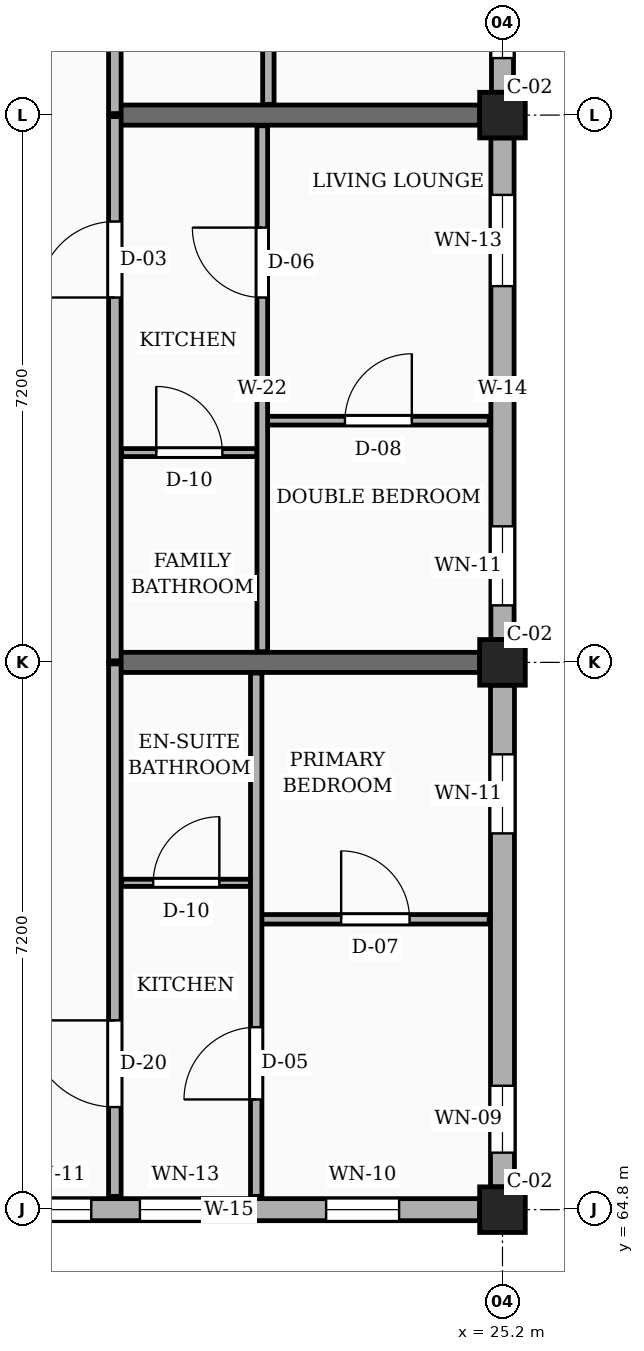
"""IFC4 building model, lengths in metres.
Left out: names, types, materials, properties, quantities, classifications, styles, units other than length and angle.
Written with IfcOpenShell. Run it as: python <this file> out.ifc"""

import sys

from ifc_helpers import new_model, si_unit, direction, frame, frame_2d, origin, origin_2d, place, context, subcontext, project, spatial, rectangle, extrude, element, fill, save


model = new_model("IFC4")
c1 = context("Model", 3, precision=1e-05, world=origin(), true_north=direction((0.0, 1.0)))
c2 = subcontext(c1, "Body", "Model", "MODEL_VIEW")
j1 = project(units=[si_unit("LENGTHUNIT", "METRE"), si_unit("PLANEANGLEUNIT", "RADIAN")], contexts=[c1])
p1 = place(None, origin())
s1 = spatial("IfcSite", under=j1, at=p1, CompositionType="ELEMENT")
p2 = place(p1, origin())
s2 = spatial("IfcBuilding", under=s1, at=p2, CompositionType="ELEMENT")
p3 = place(p2, frame((0.0, 0.0, 4.5)))
s3 = spatial("IfcBuildingStorey", under=s2, at=p3, CompositionType="ELEMENT", Elevation=4.5)
for number, where, z_axis, x_axis in (
    (1, (25.2, 64.8, 0.0), (0.0, 0.0, 1.0), (1.0, 0.0, 0.0)),
    (2, (25.2, 72.0, 0.0), (0.0, 0.0, 1.0), (1.0, 0.0, 0.0)),
    (3, (25.2, 79.2, 0.0), (0.0, 0.0, 1.0), (1.0, 0.0, 0.0)),
):
    element("IfcColumn", number, at=place(p3, frame(where, z_axis=z_axis, x_axis=x_axis)), inside=s3, PredefinedType="COLUMN", context=c2, shape_type="SweptSolid", body=[
        extrude(rectangle(XDim=0.6, YDim=0.6, at=origin_2d()), origin(), (0.0, 0.0, 1.0), 3.15),
    ])
for number, where, z_axis, x_axis in (
    (4, (20.1, 72.0, 0.0), (0.0, 0.0, 1.0), (1.0, 0.0, 0.0)),
    (5, (20.1, 79.2, 0.0), (0.0, 0.0, 1.0), (1.0, 0.0, 0.0)),
):
    element("IfcWall", number, at=place(p3, frame(where, z_axis=z_axis, x_axis=x_axis)), inside=s3, PredefinedType="SOLIDWALL", context=c2, shape_type="SweptSolid", body=[
        extrude(rectangle(XDim=4.8, YDim=0.265, at=frame_2d((2.4, 0.0))), origin(), (0.0, 0.0, 1.0), 2.21),
    ])
p4 = place(p3, frame((18.3, 64.8, 0.0), z_axis=(0.0, 0.0, 1.0), x_axis=(1.0, 0.0, 0.0)))
e6 = element("IfcWall", 6, at=p4, inside=s3, PredefinedType="SOLIDWALL", context=c2, shape_type="SweptSolid", body=[
    extrude(rectangle(XDim=6.6, YDim=0.29, at=frame_2d((3.3, 0.0))), origin(), (0.0, 0.0, 1.0), 2.48),
])
p5 = place(p4, frame((0.45, 0.0, 0.78)))
e7 = element("IfcOpeningElement", 7, at=p5, cuts=e6, PredefinedType="OPENING", context=c2, shape_type="SweptSolid", body=[
    extrude(rectangle(XDim=1.04, YDim=1.26, at=frame_2d((0.52, 0.63))), frame((0.0, 0.155, 0.0), z_axis=(0.0, -1.0, 0.0), x_axis=(1.0, 0.0, 0.0)), (0.0, 0.0, 1.0), 0.31),
])
p6 = place(p4, frame((2.13, 0.0, 0.78)))
e8 = element("IfcOpeningElement", 8, at=p6, cuts=e6, PredefinedType="OPENING", context=c2, shape_type="SweptSolid", body=[
    extrude(rectangle(XDim=1.2, YDim=1.26, at=frame_2d((0.6, 0.63))), frame((0.0, 0.155, 0.0), z_axis=(0.0, -1.0, 0.0), x_axis=(1.0, 0.0, 0.0)), (0.0, 0.0, 1.0), 0.31),
])
p7 = place(p4, frame((4.58, 0.0, 0.78)))
e9 = element("IfcOpeningElement", 9, at=p7, cuts=e6, PredefinedType="OPENING", context=c2, shape_type="SweptSolid", body=[
    extrude(rectangle(XDim=0.96, YDim=1.26, at=frame_2d((0.48, 0.63))), frame((0.0, 0.155, 0.0), z_axis=(0.0, -1.0, 0.0), x_axis=(1.0, 0.0, 0.0)), (0.0, 0.0, 1.0), 0.31),
])
p8 = place(p3, frame((25.2, 65.1, 0.0), z_axis=(0.0, 0.0, 1.0), x_axis=(0.0, 1.0, 0.0)))
e10 = element("IfcWall", 10, at=p8, inside=s3, PredefinedType="SOLIDWALL", context=c2, shape_type="SweptSolid", body=[
    extrude(rectangle(XDim=6.6, YDim=0.315, at=frame_2d((3.3, 0.0))), origin(), (0.0, 0.0, 1.0), 2.48),
])
p9 = place(p8, frame((0.45, 0.0, 0.78)))
e11 = element("IfcOpeningElement", 11, at=p9, cuts=e10, PredefinedType="OPENING", context=c2, shape_type="SweptSolid", body=[
    extrude(rectangle(XDim=0.88, YDim=1.26, at=frame_2d((0.44, 0.63))), frame((0.0, 0.167, 0.0), z_axis=(0.0, -1.0, 0.0), x_axis=(1.0, 0.0, 0.0)), (0.0, 0.0, 1.0), 0.335),
])
p10 = place(p8, frame((4.65, 0.0, 0.78)))
e12 = element("IfcOpeningElement", 12, at=p10, cuts=e10, PredefinedType="OPENING", context=c2, shape_type="SweptSolid", body=[
    extrude(rectangle(XDim=1.04, YDim=1.26, at=frame_2d((0.52, 0.63))), frame((0.0, 0.167, 0.0), z_axis=(0.0, -1.0, 0.0), x_axis=(1.0, 0.0, 0.0)), (0.0, 0.0, 1.0), 0.335),
])
p11 = place(p3, frame((25.2, 72.3, 0.0), z_axis=(0.0, 0.0, 1.0), x_axis=(0.0, 1.0, 0.0)))
e13 = element("IfcWall", 13, at=p11, inside=s3, PredefinedType="SOLIDWALL", context=c2, shape_type="SweptSolid", body=[
    extrude(rectangle(XDim=6.6, YDim=0.305, at=frame_2d((3.3, 0.0))), origin(), (0.0, 0.0, 1.0), 2.48),
])
p12 = place(p11, frame((0.45, 0.0, 0.78)))
e14 = element("IfcOpeningElement", 14, at=p12, cuts=e13, PredefinedType="OPENING", context=c2, shape_type="SweptSolid", body=[
    extrude(rectangle(XDim=1.04, YDim=1.26, at=frame_2d((0.52, 0.63))), frame((0.0, 0.163, 0.0), z_axis=(0.0, -1.0, 0.0), x_axis=(1.0, 0.0, 0.0)), (0.0, 0.0, 1.0), 0.325),
])
p13 = place(p11, frame((4.65, 0.0, 0.78)))
e15 = element("IfcOpeningElement", 15, at=p13, cuts=e13, PredefinedType="OPENING", context=c2, shape_type="SweptSolid", body=[
    extrude(rectangle(XDim=1.2, YDim=1.26, at=frame_2d((0.6, 0.63))), frame((0.0, 0.163, 0.0), z_axis=(0.0, -1.0, 0.0), x_axis=(1.0, 0.0, 0.0)), (0.0, 0.0, 1.0), 0.325),
])
p14 = place(p3, frame((25.2, 79.5, 0.0), z_axis=(0.0, 0.0, 1.0), x_axis=(0.0, 1.0, 0.0)))
e16 = element("IfcWall", 16, at=p14, inside=s3, PredefinedType="SOLIDWALL", context=c2, shape_type="SweptSolid", body=[
    extrude(rectangle(XDim=6.6, YDim=0.29, at=frame_2d((3.3, 0.0))), origin(), (0.0, 0.0, 1.0), 2.48),
])
p15 = place(p14, frame((0.45, 0.0, 0.78)))
e17 = element("IfcOpeningElement", 17, at=p15, cuts=e16, PredefinedType="OPENING", context=c2, shape_type="SweptSolid", body=[
    extrude(rectangle(XDim=1.2, YDim=1.26, at=frame_2d((0.6, 0.63))), frame((0.0, 0.155, 0.0), z_axis=(0.0, -1.0, 0.0), x_axis=(1.0, 0.0, 0.0)), (0.0, 0.0, 1.0), 0.31),
])
p16 = place(p14, frame((4.65, 0.0, 0.78)))
e18 = element("IfcOpeningElement", 18, at=p16, cuts=e16, PredefinedType="OPENING", context=c2, shape_type="SweptSolid", body=[
    extrude(rectangle(XDim=1.36, YDim=1.26, at=frame_2d((0.68, 0.63))), frame((0.0, 0.155, 0.0), z_axis=(0.0, -1.0, 0.0), x_axis=(1.0, 0.0, 0.0)), (0.0, 0.0, 1.0), 0.31),
])
p17 = place(p3, frame((20.1, 64.975, 0.0), z_axis=(0.0, 0.0, 1.0), x_axis=(0.0, 1.0, 0.0)))
e19 = element("IfcWall", 19, at=p17, inside=s3, PredefinedType="PARTITIONING", context=c2, shape_type="SweptSolid", body=[
    extrude(rectangle(XDim=7.005, YDim=0.165, at=frame_2d((3.502, 0.0))), origin(), (0.0, 0.0, 1.0), 2.345),
])
p18 = place(p17, frame((1.175, 0.0, 0.0)))
e20 = element("IfcOpeningElement", 20, at=p18, cuts=e19, PredefinedType="OPENING", context=c2, shape_type="SweptSolid", body=[
    extrude(rectangle(XDim=1.14, YDim=2.18, at=frame_2d((0.57, 1.09))), frame((0.0, 0.093, 0.0), z_axis=(0.0, -1.0, 0.0), x_axis=(1.0, 0.0, 0.0)), (0.0, 0.0, 1.0), 0.185),
])
p19 = place(p3, frame((20.1, 72.02, 0.0), z_axis=(0.0, 0.0, 1.0), x_axis=(0.0, 1.0, 0.0)))
e21 = element("IfcWall", 21, at=p19, inside=s3, PredefinedType="PARTITIONING", context=c2, shape_type="SweptSolid", body=[
    extrude(rectangle(XDim=7.16, YDim=0.165, at=frame_2d((3.58, 0.0))), origin(), (0.0, 0.0, 1.0), 2.345),
])
p20 = place(p19, frame((4.78, 0.0, 0.0)))
e22 = element("IfcOpeningElement", 22, at=p20, cuts=e21, PredefinedType="OPENING", context=c2, shape_type="SweptSolid", body=[
    extrude(rectangle(XDim=1.0, YDim=2.15, at=frame_2d((0.5, 1.075))), frame((0.0, 0.093, 0.0), z_axis=(0.0, -1.0, 0.0), x_axis=(1.0, 0.0, 0.0)), (0.0, 0.0, 1.0), 0.185),
])
p21 = place(p3, frame((20.1, 79.22, 0.0), z_axis=(0.0, 0.0, 1.0), x_axis=(0.0, 1.0, 0.0)))
e23 = element("IfcWall", 23, at=p21, inside=s3, PredefinedType="PARTITIONING", context=c2, shape_type="SweptSolid", body=[
    extrude(rectangle(XDim=7.16, YDim=0.165, at=frame_2d((3.58, 0.0))), origin(), (0.0, 0.0, 1.0), 2.345),
])
p22 = place(p21, frame((1.33, 0.0, 0.0)))
e24 = element("IfcOpeningElement", 24, at=p22, cuts=e23, PredefinedType="OPENING", context=c2, shape_type="SweptSolid", body=[
    extrude(rectangle(XDim=0.94, YDim=2.12, at=frame_2d((0.47, 1.06))), frame((0.0, 0.093, 0.0), z_axis=(0.0, -1.0, 0.0), x_axis=(1.0, 0.0, 0.0)), (0.0, 0.0, 1.0), 0.185),
])
p23 = place(p3, frame((22.03, 68.62, 0.0), z_axis=(0.0, 0.0, 1.0), x_axis=(1.0, 0.0, 0.0)))
e25 = element("IfcWall", 25, at=p23, inside=s3, PredefinedType="PARTITIONING", context=c2, shape_type="SweptSolid", body=[
    extrude(rectangle(XDim=2.995, YDim=0.125, at=frame_2d((1.498, 0.0))), origin(), (0.0, 0.0, 1.0), 2.345),
])
p24 = place(p23, frame((1.048, 0.0, 0.0)))
e26 = element("IfcOpeningElement", 26, at=p24, cuts=e25, PredefinedType="OPENING", context=c2, shape_type="SweptSolid", body=[
    extrude(rectangle(XDim=0.9, YDim=2.1, at=frame_2d((0.45, 1.05))), frame((0.0, 0.073, 0.0), z_axis=(0.0, -1.0, 0.0), x_axis=(1.0, 0.0, 0.0)), (0.0, 0.0, 1.0), 0.145),
])
p25 = place(p3, frame((20.19, 69.1, 0.0), z_axis=(0.0, 0.0, 1.0), x_axis=(1.0, 0.0, 0.0)))
e27 = element("IfcWall", 27, at=p25, inside=s3, PredefinedType="PARTITIONING", context=c2, shape_type="SweptSolid", body=[
    extrude(rectangle(XDim=1.7, YDim=0.095, at=frame_2d((0.85, 0.0))), origin(), (0.0, 0.0, 1.0), 2.345),
])
p26 = place(p25, frame((0.415, 0.0, 0.0)))
e28 = element("IfcOpeningElement", 28, at=p26, cuts=e27, PredefinedType="OPENING", context=c2, shape_type="SweptSolid", body=[
    extrude(rectangle(XDim=0.87, YDim=2.05, at=frame_2d((0.435, 1.025))), frame((0.0, 0.058, 0.0), z_axis=(0.0, -1.0, 0.0), x_axis=(1.0, 0.0, 0.0)), (0.0, 0.0, 1.0), 0.115),
])
p27 = place(p3, frame((21.96, 64.975, 0.0), z_axis=(0.0, 0.0, 1.0), x_axis=(0.0, 1.0, 0.0)))
e29 = element("IfcWall", 29, at=p27, inside=s3, PredefinedType="PARTITIONING", context=c2, shape_type="SweptSolid", body=[
    extrude(rectangle(XDim=6.885, YDim=0.15, at=frame_2d((3.442, 0.0))), origin(), (0.0, 0.0, 1.0), 2.345),
])
p28 = place(p27, frame((1.275, 0.0, 0.0)))
e30 = element("IfcOpeningElement", 30, at=p28, cuts=e29, PredefinedType="OPENING", context=c2, shape_type="SweptSolid", body=[
    extrude(rectangle(XDim=0.95, YDim=2.1, at=frame_2d((0.475, 1.05))), frame((0.0, 0.085, 0.0), z_axis=(0.0, -1.0, 0.0), x_axis=(1.0, 0.0, 0.0)), (0.0, 0.0, 1.0), 0.17),
])
p29 = place(p3, frame((22.11, 75.18, 0.0), z_axis=(0.0, 0.0, 1.0), x_axis=(1.0, 0.0, 0.0)))
e31 = element("IfcWall", 31, at=p29, inside=s3, PredefinedType="PARTITIONING", context=c2, shape_type="SweptSolid", body=[
    extrude(rectangle(XDim=2.915, YDim=0.115, at=frame_2d((1.458, 0.0))), origin(), (0.0, 0.0, 1.0), 2.345),
])
p30 = place(p29, frame((1.018, 0.0, 0.0)))
e32 = element("IfcOpeningElement", 32, at=p30, cuts=e31, PredefinedType="OPENING", context=c2, shape_type="SweptSolid", body=[
    extrude(rectangle(XDim=0.88, YDim=2.08, at=frame_2d((0.44, 1.04))), frame((0.0, 0.067, 0.0), z_axis=(0.0, -1.0, 0.0), x_axis=(1.0, 0.0, 0.0)), (0.0, 0.0, 1.0), 0.135),
])
p31 = place(p3, frame((20.19, 74.76, 0.0), z_axis=(0.0, 0.0, 1.0), x_axis=(1.0, 0.0, 0.0)))
e33 = element("IfcWall", 33, at=p31, inside=s3, PredefinedType="PARTITIONING", context=c2, shape_type="SweptSolid", body=[
    extrude(rectangle(XDim=1.78, YDim=0.105, at=frame_2d((0.89, 0.0))), origin(), (0.0, 0.0, 1.0), 2.345),
])
p32 = place(p31, frame((0.455, 0.0, 0.0)))
e34 = element("IfcOpeningElement", 34, at=p32, cuts=e33, PredefinedType="OPENING", context=c2, shape_type="SweptSolid", body=[
    extrude(rectangle(XDim=0.87, YDim=2.05, at=frame_2d((0.435, 1.025))), frame((0.0, 0.062, 0.0), z_axis=(0.0, -1.0, 0.0), x_axis=(1.0, 0.0, 0.0)), (0.0, 0.0, 1.0), 0.125),
])
p33 = place(p3, frame((22.04, 72.14, 0.0), z_axis=(0.0, 0.0, 1.0), x_axis=(0.0, 1.0, 0.0)))
e35 = element("IfcWall", 35, at=p33, inside=s3, PredefinedType="PARTITIONING", context=c2, shape_type="SweptSolid", body=[
    extrude(rectangle(XDim=6.92, YDim=0.14, at=frame_2d((3.46, 0.0))), origin(), (0.0, 0.0, 1.0), 2.345),
])
p34 = place(p33, frame((4.66, 0.0, 0.0)))
e36 = element("IfcOpeningElement", 36, at=p34, cuts=e35, PredefinedType="OPENING", context=c2, shape_type="SweptSolid", body=[
    extrude(rectangle(XDim=0.92, YDim=2.1, at=frame_2d((0.46, 1.05))), frame((0.0, 0.08, 0.0), z_axis=(0.0, -1.0, 0.0), x_axis=(1.0, 0.0, 0.0)), (0.0, 0.0, 1.0), 0.16),
])
p35 = place(p3, frame((22.12, 79.34, 0.0), z_axis=(0.0, 0.0, 1.0), x_axis=(0.0, 1.0, 0.0)))
e37 = element("IfcWall", 37, at=p35, inside=s3, PredefinedType="PARTITIONING", context=c2, shape_type="SweptSolid", body=[
    extrude(rectangle(XDim=6.92, YDim=0.15, at=frame_2d((3.46, 0.0))), origin(), (0.0, 0.0, 1.0), 2.345),
])
p36 = place(p35, frame((1.31, 0.0, 0.0)))
e38 = element("IfcOpeningElement", 38, at=p36, cuts=e37, PredefinedType="OPENING", context=c2, shape_type="SweptSolid", body=[
    extrude(rectangle(XDim=0.95, YDim=2.1, at=frame_2d((0.475, 1.05))), frame((0.0, 0.085, 0.0), z_axis=(0.0, -1.0, 0.0), x_axis=(1.0, 0.0, 0.0)), (0.0, 0.0, 1.0), 0.17),
])
p37 = place(p5, origin())
e39 = element("IfcWindow", 39, at=p37, inside=s3, PartitioningType="SINGLE_PANEL", PredefinedType="WINDOW", context=c2, shape_type="SweptSolid", body=[
    extrude(rectangle(XDim=1.04, YDim=1.26, at=frame_2d((0.52, 0.63))), frame((0.0, 0.03, 0.0), z_axis=(0.0, -1.0, 0.0), x_axis=(1.0, 0.0, 0.0)), (0.0, 0.0, 1.0), 0.06),
])
fill(e7, e39)
p38 = place(p6, origin())
e40 = element("IfcWindow", 40, at=p38, inside=s3, PartitioningType="SINGLE_PANEL", PredefinedType="WINDOW", context=c2, shape_type="SweptSolid", body=[
    extrude(rectangle(XDim=1.2, YDim=1.26, at=frame_2d((0.6, 0.63))), frame((0.0, 0.03, 0.0), z_axis=(0.0, -1.0, 0.0), x_axis=(1.0, 0.0, 0.0)), (0.0, 0.0, 1.0), 0.06),
])
fill(e8, e40)
p39 = place(p7, origin())
e41 = element("IfcWindow", 41, at=p39, inside=s3, PartitioningType="SINGLE_PANEL", PredefinedType="WINDOW", context=c2, shape_type="SweptSolid", body=[
    extrude(rectangle(XDim=0.96, YDim=1.26, at=frame_2d((0.48, 0.63))), frame((0.0, 0.03, 0.0), z_axis=(0.0, -1.0, 0.0), x_axis=(1.0, 0.0, 0.0)), (0.0, 0.0, 1.0), 0.06),
])
fill(e9, e41)
p40 = place(p9, origin())
e42 = element("IfcWindow", 42, at=p40, inside=s3, PartitioningType="SINGLE_PANEL", PredefinedType="WINDOW", context=c2, shape_type="SweptSolid", body=[
    extrude(rectangle(XDim=0.88, YDim=1.26, at=frame_2d((0.44, 0.63))), frame((0.0, 0.03, 0.0), z_axis=(0.0, -1.0, 0.0), x_axis=(1.0, 0.0, 0.0)), (0.0, 0.0, 1.0), 0.06),
])
fill(e11, e42)
p41 = place(p10, origin())
e43 = element("IfcWindow", 43, at=p41, inside=s3, PartitioningType="SINGLE_PANEL", PredefinedType="WINDOW", context=c2, shape_type="SweptSolid", body=[
    extrude(rectangle(XDim=1.04, YDim=1.26, at=frame_2d((0.52, 0.63))), frame((0.0, 0.03, 0.0), z_axis=(0.0, -1.0, 0.0), x_axis=(1.0, 0.0, 0.0)), (0.0, 0.0, 1.0), 0.06),
])
fill(e12, e43)
p42 = place(p12, origin())
e44 = element("IfcWindow", 44, at=p42, inside=s3, PartitioningType="SINGLE_PANEL", PredefinedType="WINDOW", context=c2, shape_type="SweptSolid", body=[
    extrude(rectangle(XDim=1.04, YDim=1.26, at=frame_2d((0.52, 0.63))), frame((0.0, 0.03, 0.0), z_axis=(0.0, -1.0, 0.0), x_axis=(1.0, 0.0, 0.0)), (0.0, 0.0, 1.0), 0.06),
])
fill(e14, e44)
p43 = place(p13, origin())
e45 = element("IfcWindow", 45, at=p43, inside=s3, PartitioningType="SINGLE_PANEL", PredefinedType="WINDOW", context=c2, shape_type="SweptSolid", body=[
    extrude(rectangle(XDim=1.2, YDim=1.26, at=frame_2d((0.6, 0.63))), frame((0.0, 0.03, 0.0), z_axis=(0.0, -1.0, 0.0), x_axis=(1.0, 0.0, 0.0)), (0.0, 0.0, 1.0), 0.06),
])
fill(e15, e45)
p44 = place(p15, origin())
e46 = element("IfcWindow", 46, at=p44, inside=s3, PartitioningType="SINGLE_PANEL", PredefinedType="WINDOW", context=c2, shape_type="SweptSolid", body=[
    extrude(rectangle(XDim=1.2, YDim=1.26, at=frame_2d((0.6, 0.63))), frame((0.0, 0.03, 0.0), z_axis=(0.0, -1.0, 0.0), x_axis=(1.0, 0.0, 0.0)), (0.0, 0.0, 1.0), 0.06),
])
fill(e17, e46)
p45 = place(p18, origin())
e47 = element("IfcDoor", 47, at=p45, inside=s3, OperationType="SINGLE_SWING_RIGHT", PredefinedType="DOOR", context=c2, shape_type="SweptSolid", body=[
    extrude(rectangle(XDim=1.14, YDim=2.18, at=frame_2d((0.57, 1.09))), frame((0.0, 0.025, 0.0), z_axis=(0.0, -1.0, 0.0), x_axis=(1.0, 0.0, 0.0)), (0.0, 0.0, 1.0), 0.05),
])
fill(e20, e47)
p46 = place(p20, origin())
e48 = element("IfcDoor", 48, at=p46, inside=s3, OperationType="SINGLE_SWING_LEFT", PredefinedType="DOOR", context=c2, shape_type="SweptSolid", body=[
    extrude(rectangle(XDim=1.0, YDim=2.15, at=frame_2d((0.5, 1.075))), frame((0.0, 0.025, 0.0), z_axis=(0.0, -1.0, 0.0), x_axis=(1.0, 0.0, 0.0)), (0.0, 0.0, 1.0), 0.05),
])
fill(e22, e48)
p47 = place(p24, origin())
e49 = element("IfcDoor", 49, at=p47, inside=s3, OperationType="SINGLE_SWING_LEFT", PredefinedType="DOOR", context=c2, shape_type="SweptSolid", body=[
    extrude(rectangle(XDim=0.9, YDim=2.1, at=frame_2d((0.45, 1.05))), frame((0.0, 0.025, 0.0), z_axis=(0.0, -1.0, 0.0), x_axis=(1.0, 0.0, 0.0)), (0.0, 0.0, 1.0), 0.05),
])
fill(e26, e49)
p48 = place(p26, origin())
e50 = element("IfcDoor", 50, at=p48, inside=s3, OperationType="SINGLE_SWING_RIGHT", PredefinedType="DOOR", context=c2, shape_type="SweptSolid", body=[
    extrude(rectangle(XDim=0.87, YDim=2.05, at=frame_2d((0.435, 1.025))), frame((0.0, 0.025, 0.0), z_axis=(0.0, -1.0, 0.0), x_axis=(1.0, 0.0, 0.0)), (0.0, 0.0, 1.0), 0.05),
])
fill(e28, e50)
p49 = place(p28, origin())
e51 = element("IfcDoor", 51, at=p49, inside=s3, OperationType="SINGLE_SWING_LEFT", PredefinedType="DOOR", context=c2, shape_type="SweptSolid", body=[
    extrude(rectangle(XDim=0.95, YDim=2.1, at=frame_2d((0.475, 1.05))), frame((0.0, 0.025, 0.0), z_axis=(0.0, -1.0, 0.0), x_axis=(1.0, 0.0, 0.0)), (0.0, 0.0, 1.0), 0.05),
])
fill(e30, e51)
p50 = place(p30, origin())
e52 = element("IfcDoor", 52, at=p50, inside=s3, OperationType="SINGLE_SWING_RIGHT", PredefinedType="DOOR", context=c2, shape_type="SweptSolid", body=[
    extrude(rectangle(XDim=0.88, YDim=2.08, at=frame_2d((0.44, 1.04))), frame((0.0, 0.025, 0.0), z_axis=(0.0, -1.0, 0.0), x_axis=(1.0, 0.0, 0.0)), (0.0, 0.0, 1.0), 0.05),
])
fill(e32, e52)
p51 = place(p32, origin())
e53 = element("IfcDoor", 53, at=p51, inside=s3, OperationType="SINGLE_SWING_LEFT", PredefinedType="DOOR", context=c2, shape_type="SweptSolid", body=[
    extrude(rectangle(XDim=0.87, YDim=2.05, at=frame_2d((0.435, 1.025))), frame((0.0, 0.025, 0.0), z_axis=(0.0, -1.0, 0.0), x_axis=(1.0, 0.0, 0.0)), (0.0, 0.0, 1.0), 0.05),
])
fill(e34, e53)
p52 = place(p34, origin())
e54 = element("IfcDoor", 54, at=p52, inside=s3, OperationType="SINGLE_SWING_RIGHT", PredefinedType="DOOR", context=c2, shape_type="SweptSolid", body=[
    extrude(rectangle(XDim=0.92, YDim=2.1, at=frame_2d((0.46, 1.05))), frame((0.0, 0.025, 0.0), z_axis=(0.0, -1.0, 0.0), x_axis=(1.0, 0.0, 0.0)), (0.0, 0.0, 1.0), 0.05),
])
fill(e36, e54)
save(model, sys.argv[1])
